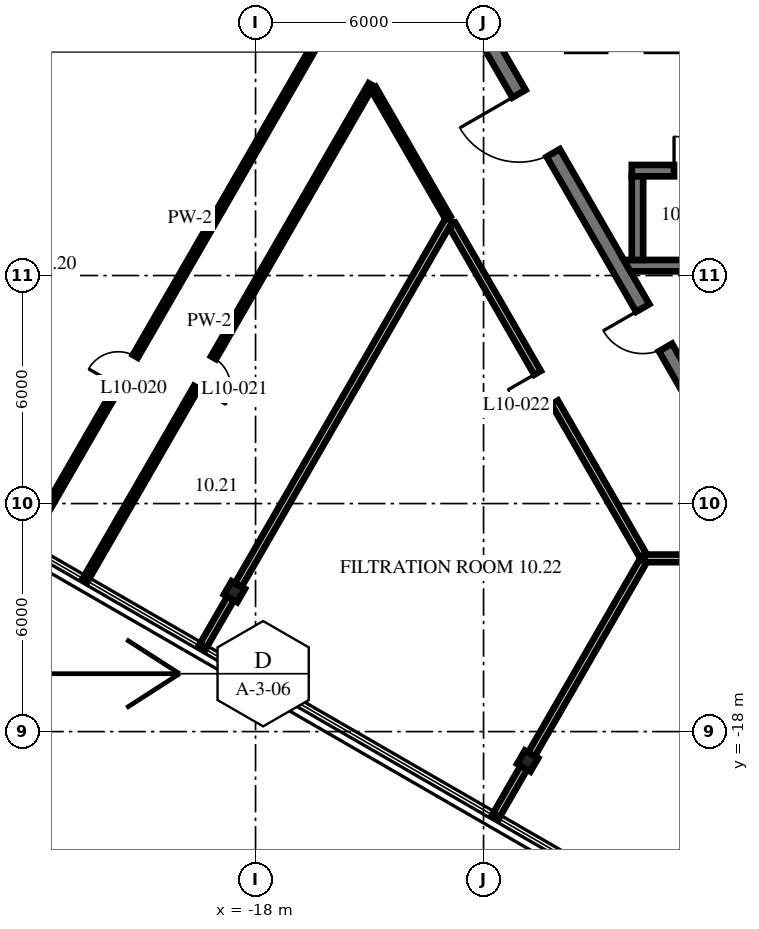
"""IFC4 building model, lengths in metres.
Left out: names, types, materials, properties, quantities, classifications, styles, units other than length and angle.
Written with IfcOpenShell. Run it as: python <this file> out.ifc"""

import sys

from ifc_helpers import new_model, si_unit, direction, frame, frame_2d, origin, origin_2d, place, context, subcontext, project, spatial, polyline, rectangle, i_section, outline, extrude, source, transform, mapped, element, fill, save


model = new_model("IFC4")
c1 = context("Model", 3, precision=1e-05, world=origin(), true_north=direction((0.0, 1.0)))
c2 = subcontext(c1, "Body", "Model", "MODEL_VIEW")
j1 = project(units=[si_unit("LENGTHUNIT", "METRE"), si_unit("PLANEANGLEUNIT", "RADIAN")], contexts=[c1])
p1 = place(None, origin())
s1 = spatial("IfcSite", under=j1, at=p1, CompositionType="ELEMENT")
p2 = place(p1, origin())
s2 = spatial("IfcBuilding", under=s1, at=p2, CompositionType="ELEMENT")
p3 = place(p2, frame((0.0, 0.0, 46.1)))
s3 = spatial("IfcBuildingStorey", under=s2, at=p3, CompositionType="ELEMENT", Elevation=46.1)
m1 = source(origin(), c2, "Body", "SweptSolid", [
    extrude(i_section(OverallWidth=0.404, OverallDepth=0.406, WebThickness=0.027, FlangeThickness=0.044, at=origin_2d()), origin(), (0.0, 0.0, 1.0), 4.3),
])
for number, where, z_axis, x_axis in (
    (1, (-18.556, -14.32, 0.0), (0.0, 0.0, 1.0), (0.866, -0.5, 0.0)),
    (2, (-10.84, -18.775, 0.0), (0.0, 0.0, 1.0), (0.866, -0.5, 0.0)),
):
    element("IfcColumn", number, at=place(p3, frame(where, z_axis=z_axis, x_axis=x_axis)), inside=s3, PredefinedType="COLUMN", context=c2, shape_type="MappedRepresentation", body=[
        mapped(m1, transform((0.0, 0.0, 0.0), scale=1.0)),
    ])
m2 = source(origin(), c2, "Body", "SweptSolid", [
    extrude(outline(polyline([(-0.115, -0.2), (11.885, -0.2), (11.654, 0.2), (0.115, 0.2), (-0.115, -0.2)])), origin(), (0.0, 0.0, 1.0), 4.1),
])
p4 = place(p3, frame((-11.769, 0.0, 0.0), z_axis=(0.0, 0.0, 1.0), x_axis=(0.499996592174, -0.866027371285, 0.0)))
e3 = element("IfcWall", 3, at=p4, inside=s3, PredefinedType="SHEAR", context=c2, shape_type="MappedRepresentation", body=[
    mapped(m2, transform((0.0, 0.0, 0.0), scale=1.0)),
])
p5 = place(p4, frame((1.405, 0.0, 0.0)))
e4 = element("IfcOpeningElement", 4, at=p5, cuts=e3, PredefinedType="OPENING", context=c2, shape_type="SweptSolid", body=[
    extrude(rectangle(XDim=1.8, YDim=2.1, at=frame_2d((0.9, 1.05))), frame((0.0, 0.21, 0.0), z_axis=(0.0, -1.0, 0.0), x_axis=(1.0, 0.0, 0.0)), (0.0, 0.0, 1.0), 0.42),
])
p6 = place(p4, frame((7.915, 0.0, 0.0)))
e5 = element("IfcOpeningElement", 5, at=p6, cuts=e3, PredefinedType="OPENING", context=c2, shape_type="SweptSolid", body=[
    extrude(rectangle(XDim=1.2, YDim=2.1, at=frame_2d((0.6, 1.05))), frame((0.0, 0.21, 0.0), z_axis=(0.0, -1.0, 0.0), x_axis=(1.0, 0.0, 0.0)), (0.0, 0.0, 1.0), 0.42),
])
m3 = source(origin(), c2, "Body", "SweptSolid", [
    extrude(rectangle(XDim=12.8, YDim=0.3, at=frame_2d((6.4, 0.0))), origin(), (0.0, 0.0, 1.0), 4.1),
])
p7 = place(p3, frame((-8.1, -3.24, 0.0), z_axis=(0.0, 0.0, 1.0), x_axis=(1.0, 0.0, 0.0)))
e6 = element("IfcWall", 6, at=p7, inside=s3, PredefinedType="SHEAR", context=c2, shape_type="MappedRepresentation", body=[
    mapped(m3, transform((0.0, 0.0, 0.0), scale=1.0)),
])
p8 = place(p7, frame((1.113, 0.0, 0.0)))
e7 = element("IfcOpeningElement", 7, at=p8, cuts=e6, PredefinedType="OPENING", context=c2, shape_type="SweptSolid", body=[
    extrude(rectangle(XDim=0.9, YDim=2.1, at=frame_2d((0.45, 1.05))), frame((0.0, 0.16, 0.0), z_axis=(0.0, -1.0, 0.0), x_axis=(1.0, 0.0, 0.0)), (0.0, 0.0, 1.0), 0.32),
])
p9 = place(p7, frame((5.788, 0.0, 0.0)))
e8 = element("IfcOpeningElement", 8, at=p9, cuts=e6, PredefinedType="OPENING", context=c2, shape_type="SweptSolid", body=[
    extrude(rectangle(XDim=0.9, YDim=2.1, at=frame_2d((0.45, 1.05))), frame((0.0, 0.16, 0.0), z_axis=(0.0, -1.0, 0.0), x_axis=(1.0, 0.0, 0.0)), (0.0, 0.0, 1.0), 0.32),
])
p10 = place(p7, frame((10.35, 0.0, 0.0)))
e9 = element("IfcOpeningElement", 9, at=p10, cuts=e6, PredefinedType="OPENING", context=c2, shape_type="SweptSolid", body=[
    extrude(rectangle(XDim=1.1, YDim=2.1, at=frame_2d((0.55, 1.05))), frame((0.0, 0.16, 0.0), z_axis=(0.0, -1.0, 0.0), x_axis=(1.0, 0.0, 0.0)), (0.0, 0.0, 1.0), 0.32),
])
m4 = source(origin(), c2, "Body", "SweptSolid", [
    extrude(outline(polyline([(12.0, -0.15), (-0.04, -0.15), (-0.213, 0.15), (12.0, 0.15), (12.0, -0.15)])), origin(), (0.0, 0.0, 1.0), 4.1),
])
p11 = place(p3, frame((-8.1, -5.74, 0.0), z_axis=(0.0, 0.0, 1.0), x_axis=(1.0, 0.0, 0.0)))
e10 = element("IfcWall", 10, at=p11, inside=s3, PredefinedType="SHEAR", context=c2, shape_type="MappedRepresentation", body=[
    mapped(m4, transform((0.0, 0.0, 0.0), scale=1.0)),
])
m5 = source(origin(), c2, "Body", "SweptSolid", [
    extrude(rectangle(XDim=2.2, YDim=0.3, at=frame_2d((1.1, 0.0))), origin(), (0.0, 0.0, 1.0), 4.1),
])
p12 = place(p3, frame((-7.95, -5.59, 0.0), z_axis=(0.0, 0.0, 1.0), x_axis=(0.0, 1.0, 0.0)))
e11 = element("IfcWall", 11, at=p12, inside=s3, PredefinedType="SHEAR", context=c2, shape_type="MappedRepresentation", body=[
    mapped(m5, transform((0.0, 0.0, 0.0), scale=1.0)),
])
p13 = place(p3, frame((-14.903, -1.073, 0.0), z_axis=(0.0, 0.0, 1.0), x_axis=(0.500012721296, -0.866018059016, 0.0)))
e12 = element("IfcWall", 12, at=p13, inside=s3, PredefinedType="PARTITIONING", context=c2, shape_type="SweptSolid", body=[
    extrude(rectangle(XDim=3.932, YDim=0.15, at=frame_2d((1.966, 0.0))), origin(), (0.0, 0.0, 1.0), 4.1),
])
p14 = place(p3, frame((-12.827, -4.668, 0.0), z_axis=(0.0, 0.0, 1.0), x_axis=(0.500014404596, -0.866017087127, 0.0)))
e13 = element("IfcWall", 13, at=p14, inside=s3, PredefinedType="PARTITIONING", context=c2, shape_type="SweptSolid", body=[
    extrude(rectangle(XDim=10.062, YDim=0.2, at=frame_2d((5.031, 0.0))), origin(), (0.0, 0.0, 1.0), 4.1),
])
p15 = place(p14, frame((4.493, 0.0, 0.0)))
e14 = element("IfcOpeningElement", 14, at=p15, cuts=e13, PredefinedType="OPENING", context=c2, shape_type="SweptSolid", body=[
    extrude(rectangle(XDim=0.9, YDim=2.1, at=frame_2d((0.45, 1.05))), frame((0.0, 0.11, 0.0), z_axis=(0.0, -1.0, 0.0), x_axis=(1.0, 0.0, 0.0)), (0.0, 0.0, 1.0), 0.22),
])
p16 = place(p3, frame((-7.761, -13.442, 0.0), z_axis=(0.0, 0.0, 1.0), x_axis=(1.0, 0.0, 0.0)))
e15 = element("IfcWall", 15, at=p16, inside=s3, PredefinedType="PARTITIONING", context=c2, shape_type="SweptSolid", body=[
    extrude(rectangle(XDim=15.492, YDim=0.2, at=frame_2d((7.746, 0.0))), origin(), (0.0, 0.0, 1.0), 4.1),
])
p17 = place(p16, frame((4.65, 0.0, 0.0)))
e16 = element("IfcOpeningElement", 16, at=p17, cuts=e15, PredefinedType="OPENING", context=c2, shape_type="SweptSolid", body=[
    extrude(rectangle(XDim=1.0, YDim=2.1, at=frame_2d((0.5, 1.05))), frame((0.0, 0.11, 0.0), z_axis=(0.0, -1.0, 0.0), x_axis=(1.0, 0.0, 0.0)), (0.0, 0.0, 1.0), 0.22),
])
m6 = source(origin(), c2, "Body", "SweptSolid", [
    extrude(rectangle(XDim=1.499, YDim=0.2, at=frame_2d((0.749, 0.0))), origin(), (0.0, 0.0, 1.0), 4.1),
])
p18 = place(p3, frame((-11.686, -20.24, 0.0), z_axis=(0.0, 0.0, 1.0), x_axis=(0.500169019818, 0.865927798153, 0.0)))
e17 = element("IfcWall", 17, at=p18, inside=s3, PredefinedType="PARTITIONING", context=c2, shape_type="MappedRepresentation", body=[
    mapped(m6, transform((0.0, 0.0, 0.0), scale=1.0)),
])
p19 = place(p3, frame((-10.743, -18.608, 0.0), z_axis=(0.0, 0.0, 1.0), x_axis=(0.499987757185, 0.866032472062, 0.0)))
e18 = element("IfcWall", 18, at=p19, inside=s3, PredefinedType="PARTITIONING", context=c2, shape_type="SweptSolid", body=[
    extrude(rectangle(XDim=5.895, YDim=0.2, at=frame_2d((2.947, 0.0))), origin(), (0.0, 0.0, 1.0), 3.488),
])
p20 = place(p3, frame((-19.402, -15.785, 0.0), z_axis=(0.0, 0.0, 1.0), x_axis=(0.499976292358, 0.866039090965, 0.0)))
e19 = element("IfcWall", 19, at=p20, inside=s3, PredefinedType="PARTITIONING", context=c2, shape_type="MappedRepresentation", body=[
    mapped(m6, transform((0.0, 0.0, 0.0), scale=1.0)),
])
m7 = source(origin(), c2, "Body", "SweptSolid", [
    extrude(rectangle(XDim=11.109, YDim=0.2, at=frame_2d((5.554, 0.0))), origin(), (0.0, 0.0, 1.0), 3.343),
])
p21 = place(p3, frame((-18.459, -14.153, 0.0), z_axis=(0.0, 0.0, 1.0), x_axis=(0.5000084499, 0.866020525177, 0.0)))
e20 = element("IfcWall", 20, at=p21, inside=s3, PredefinedType="PARTITIONING", context=c2, shape_type="MappedRepresentation", body=[
    mapped(m7, transform((0.0, 0.0, 0.0), scale=1.0)),
])
p22 = place(p3, frame((-22.481, -14.008, 0.0), z_axis=(0.0, 0.0, 1.0), x_axis=(0.500001023236, 0.866024813018, 0.0)))
e21 = element("IfcWall", 21, at=p22, inside=s3, PredefinedType="PARTITIONING", context=c2, shape_type="SweptSolid", body=[
    extrude(rectangle(XDim=15.046, YDim=0.15, at=frame_2d((7.523, 0.0))), origin(), (0.0, 0.0, 1.0), 4.1),
])
p23 = place(p22, frame((5.85, 0.0, 0.0)))
e22 = element("IfcOpeningElement", 22, at=p23, cuts=e21, PredefinedType="OPENING", context=c2, shape_type="SweptSolid", body=[
    extrude(rectangle(XDim=0.9, YDim=2.1, at=frame_2d((0.45, 1.05))), frame((0.0, 0.085, 0.0), z_axis=(0.0, -1.0, 0.0), x_axis=(1.0, 0.0, 0.0)), (0.0, 0.0, 1.0), 0.17),
])
p24 = place(p3, frame((-24.04, -13.108, 0.0), z_axis=(0.0, 0.0, 1.0), x_axis=(0.500008033299, 0.866020765707, 0.0)))
e23 = element("IfcWall", 23, at=p24, inside=s3, PredefinedType="PARTITIONING", context=c2, shape_type="SweptSolid", body=[
    extrude(rectangle(XDim=19.24, YDim=0.15, at=frame_2d((9.62, 0.0))), origin(), (0.0, 0.0, 1.0), 4.1),
])
p25 = place(p24, frame((4.852, 0.0, 0.0)))
e24 = element("IfcOpeningElement", 24, at=p25, cuts=e23, PredefinedType="OPENING", context=c2, shape_type="SweptSolid", body=[
    extrude(rectangle(XDim=0.9, YDim=2.1, at=frame_2d((0.45, 1.05))), frame((0.0, 0.085, 0.0), z_axis=(0.0, -1.0, 0.0), x_axis=(1.0, 0.0, 0.0)), (0.0, 0.0, 1.0), 0.17),
])
p26 = place(p5, frame((1.8, 0.0, 0.0), z_axis=(0.0, 0.0, 1.0), x_axis=(-1.0, 0.0, 0.0)))
e25 = element("IfcDoor", 25, at=p26, inside=s3, OperationType="DOUBLE_DOOR_DOUBLE_SWING", PredefinedType="DOOR", context=c2, shape_type="SweptSolid", body=[
    extrude(rectangle(XDim=1.8, YDim=2.1, at=frame_2d((0.9, 1.05))), frame((0.0, 0.025, 0.0), z_axis=(0.0, -1.0, 0.0), x_axis=(1.0, 0.0, 0.0)), (0.0, 0.0, 1.0), 0.05),
])
fill(e4, e25)
p27 = place(p8, origin())
e26 = element("IfcDoor", 26, at=p27, inside=s3, OperationType="SINGLE_SWING_LEFT", PredefinedType="DOOR", context=c2, shape_type="SweptSolid", body=[
    extrude(rectangle(XDim=0.9, YDim=2.1, at=frame_2d((0.45, 1.05))), frame((0.0, 0.025, 0.0), z_axis=(0.0, -1.0, 0.0), x_axis=(1.0, 0.0, 0.0)), (0.0, 0.0, 1.0), 0.05),
])
fill(e7, e26)
p28 = place(p6, frame((1.2, 0.0, 0.0), z_axis=(0.0, 0.0, 1.0), x_axis=(-1.0, 0.0, 0.0)))
e27 = element("IfcDoor", 27, at=p28, inside=s3, OperationType="SINGLE_SWING_RIGHT", PredefinedType="DOOR", context=c2, shape_type="SweptSolid", body=[
    extrude(rectangle(XDim=1.2, YDim=2.1, at=frame_2d((0.6, 1.05))), frame((0.0, 0.025, 0.0), z_axis=(0.0, -1.0, 0.0), x_axis=(1.0, 0.0, 0.0)), (0.0, 0.0, 1.0), 0.05),
])
fill(e5, e27)
p29 = place(p25, origin())
e28 = element("IfcDoor", 28, at=p29, inside=s3, OperationType="SINGLE_SWING_LEFT", PredefinedType="DOOR", context=c2, shape_type="SweptSolid", body=[
    extrude(rectangle(XDim=0.9, YDim=2.1, at=frame_2d((0.45, 1.05))), frame((0.0, 0.025, 0.0), z_axis=(0.0, -1.0, 0.0), x_axis=(1.0, 0.0, 0.0)), (0.0, 0.0, 1.0), 0.05),
])
fill(e24, e28)
p30 = place(p23, origin())
e29 = element("IfcDoor", 29, at=p30, inside=s3, OperationType="SINGLE_SWING_RIGHT", PredefinedType="DOOR", context=c2, shape_type="SweptSolid", body=[
    extrude(rectangle(XDim=0.9, YDim=2.1, at=frame_2d((0.45, 1.05))), frame((0.0, 0.025, 0.0), z_axis=(0.0, -1.0, 0.0), x_axis=(1.0, 0.0, 0.0)), (0.0, 0.0, 1.0), 0.05),
])
fill(e22, e29)
p31 = place(p15, origin())
e30 = element("IfcDoor", 30, at=p31, inside=s3, OperationType="SINGLE_SWING_RIGHT", PredefinedType="DOOR", context=c2, shape_type="SweptSolid", body=[
    extrude(rectangle(XDim=0.9, YDim=2.1, at=frame_2d((0.45, 1.05))), frame((0.0, 0.025, 0.0), z_axis=(0.0, -1.0, 0.0), x_axis=(1.0, 0.0, 0.0)), (0.0, 0.0, 1.0), 0.05),
])
fill(e14, e30)
save(model, sys.argv[1])
